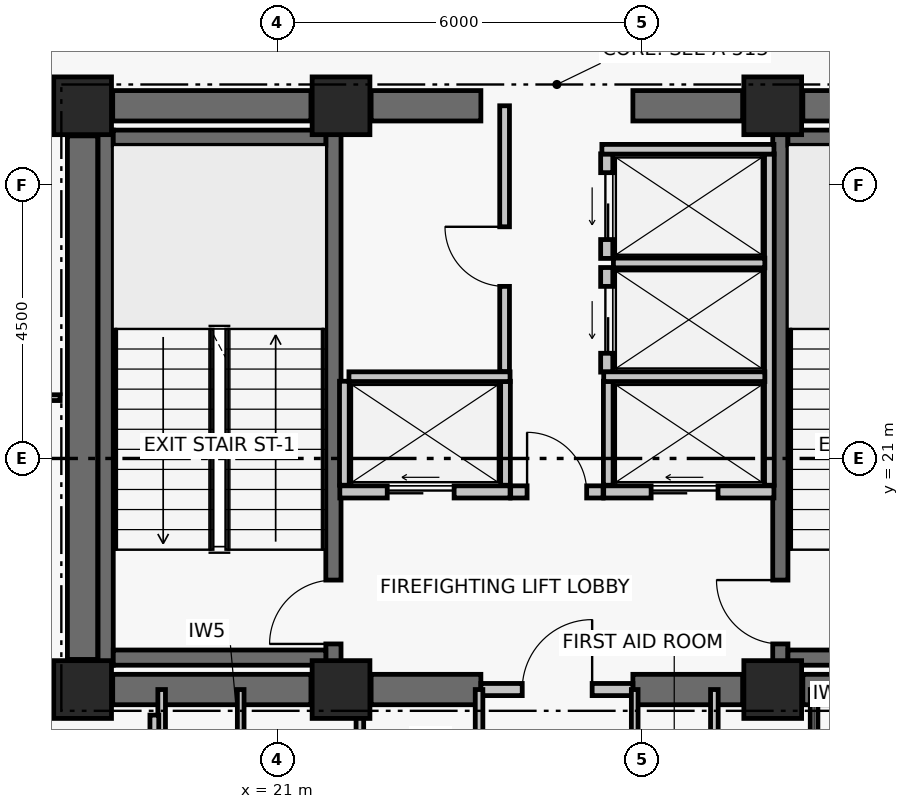
"""IFC4 building model, lengths in metres.
Left out: names, types, materials, properties, quantities, classifications, styles, units other than length and angle.
Written with IfcOpenShell. Run it as: python <this file> out.ifc"""

import sys

from ifc_helpers import new_model, si_unit, direction, frame, frame_2d, origin, origin_2d, place, context, subcontext, project, spatial, rectangle, extrude, element, fill, save


model = new_model("IFC4")
c1 = context("Model", 3, precision=1e-05, world=origin(), true_north=direction((0.0, 1.0)))
c2 = subcontext(c1, "Body", "Model", "MODEL_VIEW")
j1 = project(units=[si_unit("LENGTHUNIT", "METRE"), si_unit("PLANEANGLEUNIT", "RADIAN")], contexts=[c1])
p1 = place(None, origin())
s1 = spatial("IfcSite", under=j1, at=p1, CompositionType="ELEMENT")
p2 = place(p1, origin())
s2 = spatial("IfcBuilding", under=s1, at=p2, CompositionType="ELEMENT")
p3 = place(p2, frame((0.0, 0.0, 191.52)))
s3 = spatial("IfcBuildingStorey", under=s2, at=p3, CompositionType="ELEMENT", Elevation=191.52)
for number, where, z_axis, x_axis in (
    (1, (17.8, 17.2, 0.0), (0.0, 0.0, 1.0), (1.0, 0.0, 0.0)),
    (2, (22.05, 17.2, 0.0), (0.0, 0.0, 1.0), (1.0, 0.0, 0.0)),
    (3, (29.15, 17.2, 0.0), (0.0, 0.0, 1.0), (1.0, 0.0, 0.0)),
    (4, (17.8, 26.8, 0.0), (0.0, 0.0, 1.0), (1.0, 0.0, 0.0)),
    (5, (22.05, 26.8, 0.0), (0.0, 0.0, 1.0), (1.0, 0.0, 0.0)),
    (6, (29.15, 26.8, 0.0), (0.0, 0.0, 1.0), (1.0, 0.0, 0.0)),
):
    element("IfcColumn", number, at=place(p3, frame(where, z_axis=z_axis, x_axis=x_axis)), inside=s3, PredefinedType="COLUMN", context=c2, shape_type="SweptSolid", body=[
        extrude(rectangle(XDim=0.95, YDim=0.95, at=origin_2d()), origin(), (0.0, 0.0, 1.0), 3.72),
    ])
p4 = place(p3, frame((18.295, 17.2, 0.0), z_axis=(0.0, 0.0, 1.0), x_axis=(1.0, 0.0, 0.0)))
e7 = element("IfcWall", 7, at=p4, inside=s3, PredefinedType="SHEAR", context=c2, shape_type="SweptSolid", body=[
    extrude(rectangle(XDim=3.26, YDim=0.5, at=frame_2d((1.63, 0.0))), origin(), (0.0, 0.0, 1.0), 3.44),
])
p5 = place(p3, frame((22.545, 17.2, 0.0), z_axis=(0.0, 0.0, 1.0), x_axis=(1.0, 0.0, 0.0)))
e8 = element("IfcWall", 8, at=p5, inside=s3, PredefinedType="SHEAR", context=c2, shape_type="SweptSolid", body=[
    extrude(rectangle(XDim=1.805, YDim=0.5, at=frame_2d((0.903, 0.0))), origin(), (0.0, 0.0, 1.0), 3.44),
])
p6 = place(p3, frame((26.85, 17.2, 0.0), z_axis=(0.0, 0.0, 1.0), x_axis=(1.0, 0.0, 0.0)))
e9 = element("IfcWall", 9, at=p6, inside=s3, PredefinedType="SHEAR", context=c2, shape_type="SweptSolid", body=[
    extrude(rectangle(XDim=1.805, YDim=0.5, at=frame_2d((0.902, 0.0))), origin(), (0.0, 0.0, 1.0), 3.44),
])
for number, where, z_axis, x_axis in (
    (10, (29.645, 17.2, 0.0), (0.0, 0.0, 1.0), (1.0, 0.0, 0.0)),
    (11, (18.295, 26.8, 0.0), (0.0, 0.0, 1.0), (1.0, 0.0, 0.0)),
):
    element("IfcWall", number, at=place(p3, frame(where, z_axis=z_axis, x_axis=x_axis)), inside=s3, PredefinedType="SHEAR", context=c2, shape_type="SweptSolid", body=[
        extrude(rectangle(XDim=3.26, YDim=0.5, at=frame_2d((1.63, 0.0))), origin(), (0.0, 0.0, 1.0), 3.44),
    ])
p7 = place(p3, frame((22.545, 26.8, 0.0), z_axis=(0.0, 0.0, 1.0), x_axis=(1.0, 0.0, 0.0)))
e12 = element("IfcWall", 12, at=p7, inside=s3, PredefinedType="SHEAR", context=c2, shape_type="SweptSolid", body=[
    extrude(rectangle(XDim=1.805, YDim=0.5, at=frame_2d((0.903, 0.0))), origin(), (0.0, 0.0, 1.0), 3.44),
])
p8 = place(p3, frame((26.85, 26.8, 0.0), z_axis=(0.0, 0.0, 1.0), x_axis=(1.0, 0.0, 0.0)))
e13 = element("IfcWall", 13, at=p8, inside=s3, PredefinedType="SHEAR", context=c2, shape_type="SweptSolid", body=[
    extrude(rectangle(XDim=1.805, YDim=0.5, at=frame_2d((0.902, 0.0))), origin(), (0.0, 0.0, 1.0), 3.44),
])
p9 = place(p3, frame((29.645, 26.8, 0.0), z_axis=(0.0, 0.0, 1.0), x_axis=(1.0, 0.0, 0.0)))
e14 = element("IfcWall", 14, at=p9, inside=s3, PredefinedType="SHEAR", context=c2, shape_type="SweptSolid", body=[
    extrude(rectangle(XDim=3.26, YDim=0.5, at=frame_2d((1.63, 0.0))), origin(), (0.0, 0.0, 1.0), 3.44),
])
p10 = place(p3, frame((17.8, 17.695, 0.0), z_axis=(0.0, 0.0, 1.0), x_axis=(0.0, 1.0, 0.0)))
e15 = element("IfcWall", 15, at=p10, inside=s3, PredefinedType="SHEAR", context=c2, shape_type="SweptSolid", body=[
    extrude(rectangle(XDim=8.61, YDim=0.5, at=frame_2d((4.305, 0.0))), origin(), (0.0, 0.0, 1.0), 3.44),
])
p11 = place(p3, frame((18.179, 17.6, 0.0), z_axis=(0.0, 0.0, 1.0), x_axis=(0.0, 1.0, 0.0)))
e16 = element("IfcWall", 16, at=p11, inside=s3, PredefinedType="SHEAR", context=c2, shape_type="SweptSolid", body=[
    extrude(rectangle(XDim=8.8, YDim=0.25, at=frame_2d((4.4, 0.0))), origin(), (0.0, 0.0, 1.0), 3.44),
])
p12 = place(p3, frame((21.925, 17.6, 0.0), z_axis=(0.0, 0.0, 1.0), x_axis=(0.0, 1.0, 0.0)))
e17 = element("IfcWall", 17, at=p12, inside=s3, PredefinedType="SHEAR", context=c2, shape_type="SweptSolid", body=[
    extrude(rectangle(XDim=8.8, YDim=0.25, at=frame_2d((4.4, 0.0))), origin(), (0.0, 0.0, 1.0), 3.44),
])
p13 = place(p12, frame((0.35, 0.0, 0.0)))
e18 = element("IfcOpeningElement", 18, at=p13, cuts=e17, PredefinedType="OPENING", context=c2, shape_type="SweptSolid", body=[
    extrude(rectangle(XDim=1.05, YDim=2.08, at=frame_2d((0.525, 1.04))), frame((0.0, 0.135, 0.0), z_axis=(0.0, -1.0, 0.0), x_axis=(1.0, 0.0, 0.0)), (0.0, 0.0, 1.0), 0.27),
])
for number, where, z_axis, x_axis in (
    (19, (18.304, 17.725, 0.0), (0.0, 0.0, 1.0), (1.0, 0.0, 0.0)),
    (20, (18.304, 26.275, 0.0), (0.0, 0.0, 1.0), (1.0, 0.0, 0.0)),
):
    element("IfcWall", number, at=place(p3, frame(where, z_axis=z_axis, x_axis=x_axis)), inside=s3, PredefinedType="SHEAR", context=c2, shape_type="SweptSolid", body=[
        extrude(rectangle(XDim=3.496, YDim=0.25, at=frame_2d((1.748, 0.0))), origin(), (0.0, 0.0, 1.0), 3.44),
    ])
p14 = place(p3, frame((29.275, 17.6, 0.0), z_axis=(0.0, 0.0, 1.0), x_axis=(0.0, 1.0, 0.0)))
e21 = element("IfcWall", 21, at=p14, inside=s3, PredefinedType="SHEAR", context=c2, shape_type="SweptSolid", body=[
    extrude(rectangle(XDim=8.8, YDim=0.25, at=frame_2d((4.4, 0.0))), origin(), (0.0, 0.0, 1.0), 3.44),
])
p15 = place(p14, frame((0.35, 0.0, 0.0)))
e22 = element("IfcOpeningElement", 22, at=p15, cuts=e21, PredefinedType="OPENING", context=c2, shape_type="SweptSolid", body=[
    extrude(rectangle(XDim=1.05, YDim=2.08, at=frame_2d((0.525, 1.04))), frame((0.0, 0.135, 0.0), z_axis=(0.0, -1.0, 0.0), x_axis=(1.0, 0.0, 0.0)), (0.0, 0.0, 1.0), 0.27),
])
for number, where, z_axis, x_axis in (
    (23, (29.4, 17.725, 0.0), (0.0, 0.0, 1.0), (1.0, 0.0, 0.0)),
    (24, (29.4, 26.275, 0.0), (0.0, 0.0, 1.0), (1.0, 0.0, 0.0)),
):
    element("IfcWall", number, at=place(p3, frame(where, z_axis=z_axis, x_axis=x_axis)), inside=s3, PredefinedType="SHEAR", context=c2, shape_type="SweptSolid", body=[
        extrude(rectangle(XDim=3.496, YDim=0.25, at=frame_2d((1.748, 0.0))), origin(), (0.0, 0.0, 1.0), 3.44),
    ])
p16 = place(p3, frame((24.35, 17.2, 0.0), z_axis=(0.0, 0.0, 1.0), x_axis=(1.0, 0.0, 0.0)))
e25 = element("IfcWall", 25, at=p16, inside=s3, PredefinedType="PARTITIONING", context=c2, shape_type="SweptSolid", body=[
    extrude(rectangle(XDim=2.5, YDim=0.2, at=frame_2d((1.25, 0.0))), origin(), (0.0, 0.0, 1.0), 2.57),
])
p17 = place(p16, frame((0.68, 0.0, 0.0)))
e26 = element("IfcOpeningElement", 26, at=p17, cuts=e25, PredefinedType="OPENING", context=c2, shape_type="SweptSolid", body=[
    extrude(rectangle(XDim=1.15, YDim=2.08, at=frame_2d((0.575, 1.04))), frame((0.0, 0.11, 0.0), z_axis=(0.0, -1.0, 0.0), x_axis=(1.0, 0.0, 0.0)), (0.0, 0.0, 1.0), 0.22),
])
p18 = place(p3, frame((24.84, 20.45, 0.0), z_axis=(0.0, 0.0, 1.0), x_axis=(1.0, 0.0, 0.0)))
e27 = element("IfcWall", 27, at=p18, inside=s3, PredefinedType="PARTITIONING", context=c2, shape_type="SweptSolid", body=[
    extrude(rectangle(XDim=1.52, YDim=0.2, at=frame_2d((0.76, 0.0))), origin(), (0.0, 0.0, 1.0), 3.44),
])
p19 = place(p18, frame((0.27, 0.0, 0.0)))
e28 = element("IfcOpeningElement", 28, at=p19, cuts=e27, PredefinedType="OPENING", context=c2, shape_type="SweptSolid", body=[
    extrude(rectangle(XDim=0.98, YDim=2.06, at=frame_2d((0.49, 1.03))), frame((0.0, 0.11, 0.0), z_axis=(0.0, -1.0, 0.0), x_axis=(1.0, 0.0, 0.0)), (0.0, 0.0, 1.0), 0.22),
])
p20 = place(p3, frame((22.03, 20.45, 0.0), z_axis=(0.0, 0.0, 1.0), x_axis=(1.0, 0.0, 0.0)))
e29 = element("IfcWall", 29, at=p20, inside=s3, PredefinedType="PARTITIONING", context=c2, shape_type="SweptSolid", body=[
    extrude(rectangle(XDim=2.8, YDim=0.2, at=frame_2d((1.4, 0.0))), origin(), (0.0, 0.0, 1.0), 3.44),
])
p21 = place(p20, frame((0.78, 0.0, 0.0)))
e30 = element("IfcOpeningElement", 30, at=p21, cuts=e29, PredefinedType="OPENING", context=c2, shape_type="SweptSolid", body=[
    extrude(rectangle(XDim=1.1, YDim=2.08, at=frame_2d((0.55, 1.04))), frame((0.0, 0.11, 0.0), z_axis=(0.0, -1.0, 0.0), x_axis=(1.0, 0.0, 0.0)), (0.0, 0.0, 1.0), 0.22),
])
p22 = place(p3, frame((26.37, 20.45, 0.0), z_axis=(0.0, 0.0, 1.0), x_axis=(1.0, 0.0, 0.0)))
e31 = element("IfcWall", 31, at=p22, inside=s3, PredefinedType="PARTITIONING", context=c2, shape_type="SweptSolid", body=[
    extrude(rectangle(XDim=2.8, YDim=0.2, at=frame_2d((1.4, 0.0))), origin(), (0.0, 0.0, 1.0), 3.44),
])
p23 = place(p22, frame((0.78, 0.0, 0.0)))
e32 = element("IfcOpeningElement", 32, at=p23, cuts=e31, PredefinedType="OPENING", context=c2, shape_type="SweptSolid", body=[
    extrude(rectangle(XDim=1.1, YDim=2.08, at=frame_2d((0.55, 1.04))), frame((0.0, 0.11, 0.0), z_axis=(0.0, -1.0, 0.0), x_axis=(1.0, 0.0, 0.0)), (0.0, 0.0, 1.0), 0.22),
])
p24 = place(p3, frame((26.42, 22.42, 0.0), z_axis=(0.0, 0.0, 1.0), x_axis=(0.0, 1.0, 0.0)))
e33 = element("IfcWall", 33, at=p24, inside=s3, PredefinedType="PARTITIONING", context=c2, shape_type="SweptSolid", body=[
    extrude(rectangle(XDim=1.72, YDim=0.2, at=frame_2d((0.86, 0.0))), origin(), (0.0, 0.0, 1.0), 3.44),
])
p25 = place(p24, frame((0.31, 0.0, 0.0)))
e34 = element("IfcOpeningElement", 34, at=p25, cuts=e33, PredefinedType="OPENING", context=c2, shape_type="SweptSolid", body=[
    extrude(rectangle(XDim=1.1, YDim=2.08, at=frame_2d((0.55, 1.04))), frame((0.0, 0.11, 0.0), z_axis=(0.0, -1.0, 0.0), x_axis=(1.0, 0.0, 0.0)), (0.0, 0.0, 1.0), 0.22),
])
p26 = place(p3, frame((26.42, 24.29, 0.0), z_axis=(0.0, 0.0, 1.0), x_axis=(0.0, 1.0, 0.0)))
e35 = element("IfcWall", 35, at=p26, inside=s3, PredefinedType="PARTITIONING", context=c2, shape_type="SweptSolid", body=[
    extrude(rectangle(XDim=1.72, YDim=0.2, at=frame_2d((0.86, 0.0))), origin(), (0.0, 0.0, 1.0), 3.44),
])
p27 = place(p26, frame((0.31, 0.0, 0.0)))
e36 = element("IfcOpeningElement", 36, at=p27, cuts=e35, PredefinedType="OPENING", context=c2, shape_type="SweptSolid", body=[
    extrude(rectangle(XDim=1.1, YDim=2.08, at=frame_2d((0.55, 1.04))), frame((0.0, 0.11, 0.0), z_axis=(0.0, -1.0, 0.0), x_axis=(1.0, 0.0, 0.0)), (0.0, 0.0, 1.0), 0.22),
])
for number, where, z_axis, x_axis in (
    (37, (22.105, 20.56, 0.0), (0.0, 0.0, 1.0), (0.0, 1.0, 0.0)),
    (38, (24.755, 20.56, 0.0), (0.0, 0.0, 1.0), (0.0, 1.0, 0.0)),
):
    element("IfcWall", number, at=place(p3, frame(where, z_axis=z_axis, x_axis=x_axis)), inside=s3, PredefinedType="PARTITIONING", context=c2, shape_type="SweptSolid", body=[
        extrude(rectangle(XDim=1.71, YDim=0.16, at=frame_2d((0.855, 0.0))), origin(), (0.0, 0.0, 1.0), 3.44),
    ])
p28 = place(p3, frame((22.18, 22.345, 0.0), z_axis=(0.0, 0.0, 1.0), x_axis=(1.0, 0.0, 0.0)))
e39 = element("IfcWall", 39, at=p28, inside=s3, PredefinedType="PARTITIONING", context=c2, shape_type="SweptSolid", body=[
    extrude(rectangle(XDim=2.65, YDim=0.16, at=frame_2d((1.325, 0.0))), origin(), (0.0, 0.0, 1.0), 3.44),
])
p29 = place(p3, frame((29.095, 20.56, 0.0), z_axis=(0.0, 0.0, 1.0), x_axis=(0.0, 1.0, 0.0)))
e40 = element("IfcWall", 40, at=p29, inside=s3, PredefinedType="PARTITIONING", context=c2, shape_type="SweptSolid", body=[
    extrude(rectangle(XDim=5.45, YDim=0.16, at=frame_2d((2.725, 0.0))), origin(), (0.0, 0.0, 1.0), 3.44),
])
p30 = place(p3, frame((26.445, 20.56, 0.0), z_axis=(0.0, 0.0, 1.0), x_axis=(0.0, 1.0, 0.0)))
e41 = element("IfcWall", 41, at=p30, inside=s3, PredefinedType="PARTITIONING", context=c2, shape_type="SweptSolid", body=[
    extrude(rectangle(XDim=1.71, YDim=0.16, at=frame_2d((0.855, 0.0))), origin(), (0.0, 0.0, 1.0), 3.44),
])
p31 = place(p3, frame((26.37, 22.345, 0.0), z_axis=(0.0, 0.0, 1.0), x_axis=(1.0, 0.0, 0.0)))
e42 = element("IfcWall", 42, at=p31, inside=s3, PredefinedType="PARTITIONING", context=c2, shape_type="SweptSolid", body=[
    extrude(rectangle(XDim=2.65, YDim=0.16, at=frame_2d((1.325, 0.0))), origin(), (0.0, 0.0, 1.0), 3.44),
])
p32 = place(p3, frame((26.53, 24.215, 0.0), z_axis=(0.0, 0.0, 1.0), x_axis=(1.0, 0.0, 0.0)))
e43 = element("IfcWall", 43, at=p32, inside=s3, PredefinedType="PARTITIONING", context=c2, shape_type="SweptSolid", body=[
    extrude(rectangle(XDim=2.49, YDim=0.16, at=frame_2d((1.245, 0.0))), origin(), (0.0, 0.0, 1.0), 3.44),
])
p33 = place(p3, frame((26.34, 26.085, 0.0), z_axis=(0.0, 0.0, 1.0), x_axis=(1.0, 0.0, 0.0)))
e44 = element("IfcWall", 44, at=p33, inside=s3, PredefinedType="PARTITIONING", context=c2, shape_type="SweptSolid", body=[
    extrude(rectangle(XDim=2.83, YDim=0.16, at=frame_2d((1.415, 0.0))), origin(), (0.0, 0.0, 1.0), 3.44),
])
p34 = place(p3, frame((24.74, 22.43, 0.0), z_axis=(0.0, 0.0, 1.0), x_axis=(0.0, 1.0, 0.0)))
e45 = element("IfcWall", 45, at=p34, inside=s3, PredefinedType="PARTITIONING", context=c2, shape_type="SweptSolid", body=[
    extrude(rectangle(XDim=4.37, YDim=0.16, at=frame_2d((2.185, 0.0))), origin(), (0.0, 0.0, 1.0), 2.57),
])
p35 = place(p34, frame((1.4, 0.0, 0.0)))
e46 = element("IfcOpeningElement", 46, at=p35, cuts=e45, PredefinedType="OPENING", context=c2, shape_type="SweptSolid", body=[
    extrude(rectangle(XDim=0.98, YDim=2.06, at=frame_2d((0.49, 1.03))), frame((0.0, 0.09, 0.0), z_axis=(0.0, -1.0, 0.0), x_axis=(1.0, 0.0, 0.0)), (0.0, 0.0, 1.0), 0.18),
])
p36 = place(p3, frame((19.1, 14.95, 0.0), z_axis=(0.0, 0.0, 1.0), x_axis=(0.0, 1.0, 0.0)))
e47 = element("IfcWall", 47, at=p36, inside=s3, PredefinedType="PARTITIONING", context=c2, shape_type="SweptSolid", body=[
    extrude(rectangle(XDim=2.25, YDim=0.125, at=frame_2d((1.125, 0.0))), origin(), (0.0, 0.0, 1.0), 2.57),
])
p37 = place(p3, frame((20.4, 14.95, 0.0), z_axis=(0.0, 0.0, 1.0), x_axis=(0.0, 1.0, 0.0)))
e48 = element("IfcWall", 48, at=p37, inside=s3, PredefinedType="PARTITIONING", context=c2, shape_type="SweptSolid", body=[
    extrude(rectangle(XDim=2.25, YDim=0.11, at=frame_2d((1.125, 0.0))), origin(), (0.0, 0.0, 1.0), 2.57),
])
p38 = place(p3, frame((22.36, 14.95, 0.0), z_axis=(0.0, 0.0, 1.0), x_axis=(0.0, 1.0, 0.0)))
e49 = element("IfcWall", 49, at=p38, inside=s3, PredefinedType="PARTITIONING", context=c2, shape_type="SweptSolid", body=[
    extrude(rectangle(XDim=2.25, YDim=0.125, at=frame_2d((1.125, 0.0))), origin(), (0.0, 0.0, 1.0), 2.17),
])
p39 = place(p3, frame((24.32, 14.95, 0.0), z_axis=(0.0, 0.0, 1.0), x_axis=(0.0, 1.0, 0.0)))
e50 = element("IfcWall", 50, at=p39, inside=s3, PredefinedType="PARTITIONING", context=c2, shape_type="SweptSolid", body=[
    extrude(rectangle(XDim=2.25, YDim=0.125, at=frame_2d((1.125, 0.0))), origin(), (0.0, 0.0, 1.0), 2.57),
])
p40 = place(p3, frame((26.88, 14.95, 0.0), z_axis=(0.0, 0.0, 1.0), x_axis=(0.0, 1.0, 0.0)))
e51 = element("IfcWall", 51, at=p40, inside=s3, PredefinedType="PARTITIONING", context=c2, shape_type="SweptSolid", body=[
    extrude(rectangle(XDim=2.25, YDim=0.11, at=frame_2d((1.125, 0.0))), origin(), (0.0, 0.0, 1.0), 2.57),
])
for number, where, z_axis, x_axis in (
    (52, (28.19, 14.95, 0.0), (0.0, 0.0, 1.0), (0.0, 1.0, 0.0)),
    (53, (29.83, 14.95, 0.0), (0.0, 0.0, 1.0), (0.0, 1.0, 0.0)),
):
    element("IfcWall", number, at=place(p3, frame(where, z_axis=z_axis, x_axis=x_axis)), inside=s3, PredefinedType="PARTITIONING", context=c2, shape_type="SweptSolid", body=[
        extrude(rectangle(XDim=2.25, YDim=0.125, at=frame_2d((1.125, 0.0))), origin(), (0.0, 0.0, 1.0), 2.57),
    ])
p41 = place(p3, frame((18.98, 16.78, 0.0), z_axis=(0.0, 0.0, 1.0), x_axis=(0.0, -1.0, 0.0)))
e54 = element("IfcWall", 54, at=p41, inside=s3, PredefinedType="PARTITIONING", context=c2, shape_type="SweptSolid", body=[
    extrude(rectangle(XDim=1.85, YDim=0.145, at=frame_2d((0.925, 0.0))), origin(), (0.0, 0.0, 1.0), 2.57),
])
p42 = place(p3, frame((15.2, 27.06, 0.0), z_axis=(0.0, 0.0, 1.0), x_axis=(1.0, 0.0, 0.0)))
e55 = element("IfcWall", 55, at=p42, inside=s3, PredefinedType="PARTITIONING", context=c2, shape_type="SweptSolid", body=[
    extrude(rectangle(XDim=2.18, YDim=0.145, at=frame_2d((1.09, 0.0))), origin(), (0.0, 0.0, 1.0), 2.17),
])
p43 = place(p3, frame((11.822, 22.0, 0.0), z_axis=(0.0, 0.0, 1.0), x_axis=(1.0, 0.0, 0.0)))
e56 = element("IfcWall", 56, at=p43, inside=s3, PredefinedType="PARTITIONING", context=c2, shape_type="SweptSolid", body=[
    extrude(rectangle(XDim=5.608, YDim=0.095, at=frame_2d((2.804, 0.0))), origin(), (0.0, 0.0, 1.0), 2.57),
])
p44 = place(p13, origin())
e57 = element("IfcDoor", 57, at=p44, inside=s3, OperationType="SINGLE_SWING_LEFT", PredefinedType="DOOR", context=c2, shape_type="SweptSolid", body=[
    extrude(rectangle(XDim=1.05, YDim=2.08, at=frame_2d((0.525, 1.04))), frame((0.0, 0.025, 0.0), z_axis=(0.0, -1.0, 0.0), x_axis=(1.0, 0.0, 0.0)), (0.0, 0.0, 1.0), 0.05),
])
fill(e18, e57)
p45 = place(p15, origin())
e58 = element("IfcDoor", 58, at=p45, inside=s3, OperationType="SINGLE_SWING_RIGHT", PredefinedType="DOOR", context=c2, shape_type="SweptSolid", body=[
    extrude(rectangle(XDim=1.05, YDim=2.08, at=frame_2d((0.525, 1.04))), frame((0.0, 0.025, 0.0), z_axis=(0.0, -1.0, 0.0), x_axis=(1.0, 0.0, 0.0)), (0.0, 0.0, 1.0), 0.05),
])
fill(e22, e58)
p46 = place(p17, origin())
e59 = element("IfcDoor", 59, at=p46, inside=s3, OperationType="SINGLE_SWING_RIGHT", PredefinedType="DOOR", context=c2, shape_type="SweptSolid", body=[
    extrude(rectangle(XDim=1.15, YDim=2.08, at=frame_2d((0.575, 1.04))), frame((0.0, 0.025, 0.0), z_axis=(0.0, -1.0, 0.0), x_axis=(1.0, 0.0, 0.0)), (0.0, 0.0, 1.0), 0.05),
])
fill(e26, e59)
p47 = place(p19, origin())
e60 = element("IfcDoor", 60, at=p47, inside=s3, OperationType="SINGLE_SWING_LEFT", PredefinedType="DOOR", context=c2, shape_type="SweptSolid", body=[
    extrude(rectangle(XDim=0.98, YDim=2.06, at=frame_2d((0.49, 1.03))), frame((0.0, 0.025, 0.0), z_axis=(0.0, -1.0, 0.0), x_axis=(1.0, 0.0, 0.0)), (0.0, 0.0, 1.0), 0.05),
])
fill(e28, e60)
p48 = place(p21, origin())
e61 = element("IfcDoor", 61, at=p48, inside=s3, OperationType="DOUBLE_DOOR_SLIDING", PredefinedType="DOOR", context=c2, shape_type="SweptSolid", body=[
    extrude(rectangle(XDim=1.1, YDim=2.08, at=frame_2d((0.55, 1.04))), frame((0.0, 0.025, 0.0), z_axis=(0.0, -1.0, 0.0), x_axis=(1.0, 0.0, 0.0)), (0.0, 0.0, 1.0), 0.05),
])
fill(e30, e61)
p49 = place(p23, origin())
e62 = element("IfcDoor", 62, at=p49, inside=s3, OperationType="DOUBLE_DOOR_SLIDING", PredefinedType="DOOR", context=c2, shape_type="SweptSolid", body=[
    extrude(rectangle(XDim=1.1, YDim=2.08, at=frame_2d((0.55, 1.04))), frame((0.0, 0.025, 0.0), z_axis=(0.0, -1.0, 0.0), x_axis=(1.0, 0.0, 0.0)), (0.0, 0.0, 1.0), 0.05),
])
fill(e32, e62)
p50 = place(p25, origin())
e63 = element("IfcDoor", 63, at=p50, inside=s3, OperationType="DOUBLE_DOOR_SLIDING", PredefinedType="DOOR", context=c2, shape_type="SweptSolid", body=[
    extrude(rectangle(XDim=1.1, YDim=2.08, at=frame_2d((0.55, 1.04))), frame((0.0, 0.025, 0.0), z_axis=(0.0, -1.0, 0.0), x_axis=(1.0, 0.0, 0.0)), (0.0, 0.0, 1.0), 0.05),
])
fill(e34, e63)
p51 = place(p27, origin())
e64 = element("IfcDoor", 64, at=p51, inside=s3, OperationType="DOUBLE_DOOR_SLIDING", PredefinedType="DOOR", context=c2, shape_type="SweptSolid", body=[
    extrude(rectangle(XDim=1.1, YDim=2.08, at=frame_2d((0.55, 1.04))), frame((0.0, 0.025, 0.0), z_axis=(0.0, -1.0, 0.0), x_axis=(1.0, 0.0, 0.0)), (0.0, 0.0, 1.0), 0.05),
])
fill(e36, e64)
p52 = place(p35, origin())
e65 = element("IfcDoor", 65, at=p52, inside=s3, OperationType="SINGLE_SWING_RIGHT", PredefinedType="DOOR", context=c2, shape_type="SweptSolid", body=[
    extrude(rectangle(XDim=0.98, YDim=2.06, at=frame_2d((0.49, 1.03))), frame((0.0, 0.025, 0.0), z_axis=(0.0, -1.0, 0.0), x_axis=(1.0, 0.0, 0.0)), (0.0, 0.0, 1.0), 0.05),
])
fill(e46, e65)
save(model, sys.argv[1])
